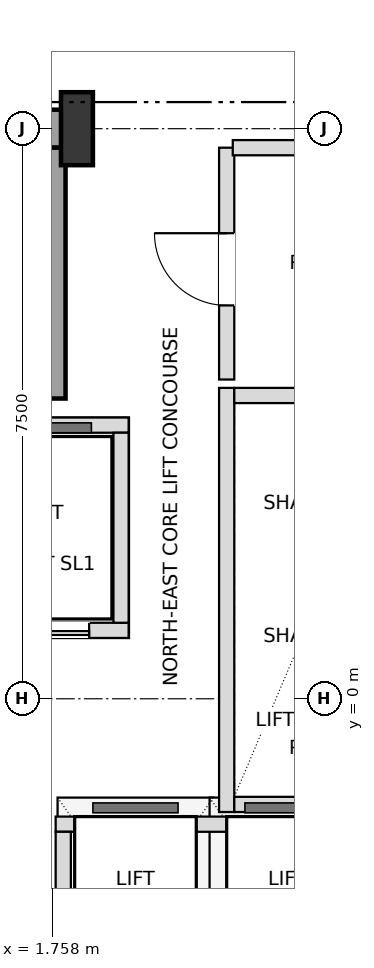
"""IFC4 building model, lengths in metres.
Left out: names, types, materials, properties, quantities, classifications, styles, units other than length and angle.
Written with IfcOpenShell. Run it as: python <this file> out.ifc"""

import sys

from ifc_helpers import new_model, si_unit, direction, frame, frame_2d, origin, origin_2d, place, context, subcontext, project, spatial, rectangle, i_section, extrude, element, fill, save


model = new_model("IFC4")
c1 = context("Model", 3, precision=1e-05, world=origin(), true_north=direction((0.0, 1.0)))
c2 = subcontext(c1, "Body", "Model", "MODEL_VIEW")
j1 = project(units=[si_unit("LENGTHUNIT", "METRE"), si_unit("PLANEANGLEUNIT", "RADIAN")], contexts=[c1])
p1 = place(None, origin())
s1 = spatial("IfcSite", under=j1, at=p1, CompositionType="ELEMENT")
p2 = place(p1, origin())
s2 = spatial("IfcBuilding", under=s1, at=p2, CompositionType="ELEMENT")
p3 = place(p2, frame((0.0, 0.0, 64.8)))
s3 = spatial("IfcBuildingStorey", under=s2, at=p3, CompositionType="ELEMENT", Elevation=64.8)
p4 = place(p3, frame((2.08, 7.5, 0.0), z_axis=(0.0, 0.0, 1.0), x_axis=(1.0, 0.0, 0.0)))
e1 = element("IfcColumn", 1, at=p4, inside=s3, PredefinedType="COLUMN", context=c2, shape_type="SweptSolid", body=[
    extrude(i_section(OverallWidth=0.42, OverallDepth=0.96, WebThickness=0.022, FlangeThickness=0.034, at=origin_2d()), origin(), (0.0, 0.0, 1.0), 3.6),
])
p5 = place(p3, frame((0.0, 7.5, 0.0), z_axis=(0.0, 0.0, 1.0), x_axis=(1.0, 0.0, 0.0)))
e2 = element("IfcWall", 2, at=p5, inside=s3, PredefinedType="SHEAR", context=c2, shape_type="SweptSolid", body=[
    extrude(rectangle(XDim=2.08, YDim=0.5, at=frame_2d((1.04, 0.0))), origin(), (0.0, 0.0, 1.0), 3.38),
])
p6 = place(p3, frame((1.73, 3.95, 0.0), z_axis=(0.0, 0.0, 1.0), x_axis=(0.0, 1.0, 0.0)))
e3 = element("IfcWall", 3, at=p6, inside=s3, PredefinedType="SHEAR", context=c2, shape_type="SweptSolid", body=[
    extrude(rectangle(XDim=3.3, YDim=0.4, at=frame_2d((1.65, 0.0))), origin(), (0.0, 0.0, 1.0), 3.38),
])
p7 = place(p3, frame((4.05, -1.49, 0.0), z_axis=(0.0, 0.0, 1.0), x_axis=(0.0, 1.0, 0.0)))
e4 = element("IfcWall", 4, at=p7, inside=s3, PredefinedType="SOLIDWALL", context=c2, shape_type="SweptSolid", body=[
    extrude(rectangle(XDim=5.58, YDim=0.2, at=frame_2d((2.79, 0.0))), origin(), (0.0, 0.0, 1.0), 3.38),
])
for number, where, z_axis, x_axis in (
    (5, (4.15, -1.39, 0.0), (0.0, 0.0, 1.0), (1.0, 0.0, 0.0)),
    (6, (4.15, 3.99, 0.0), (0.0, 0.0, 1.0), (1.0, 0.0, 0.0)),
):
    element("IfcWall", number, at=place(p3, frame(where, z_axis=z_axis, x_axis=x_axis)), inside=s3, PredefinedType="SOLIDWALL", context=c2, shape_type="SweptSolid", body=[
        extrude(rectangle(XDim=2.2, YDim=0.2, at=frame_2d((1.1, 0.0))), origin(), (0.0, 0.0, 1.0), 3.38),
    ])
p8 = place(p3, frame((-2.82, 0.9, 0.0), z_axis=(0.0, 0.0, 1.0), x_axis=(1.0, 0.0, 0.0)))
e7 = element("IfcWall", 7, at=p8, inside=s3, PredefinedType="SOLIDWALL", context=c2, shape_type="SweptSolid", body=[
    extrude(rectangle(XDim=5.58, YDim=0.2, at=frame_2d((2.79, 0.0))), origin(), (0.0, 0.0, 1.0), 3.38),
])
p9 = place(p8, frame((3.86, 0.0, 0.0)))
e8 = element("IfcOpeningElement", 8, at=p9, cuts=e7, PredefinedType="OPENING", context=c2, shape_type="SweptSolid", body=[
    extrude(rectangle(XDim=1.2, YDim=2.2, at=frame_2d((0.6, 1.1))), frame((0.0, 0.11, 0.0), z_axis=(0.0, -1.0, 0.0), x_axis=(1.0, 0.0, 0.0)), (0.0, 0.0, 1.0), 0.22),
])
p10 = place(p3, frame((-2.82, 3.6, 0.0), z_axis=(0.0, 0.0, 1.0), x_axis=(1.0, 0.0, 0.0)))
e9 = element("IfcWall", 9, at=p10, inside=s3, PredefinedType="SOLIDWALL", context=c2, shape_type="SweptSolid", body=[
    extrude(rectangle(XDim=5.58, YDim=0.2, at=frame_2d((2.79, 0.0))), origin(), (0.0, 0.0, 1.0), 3.38),
])
p11 = place(p3, frame((2.66, 1.0, 0.0), z_axis=(0.0, 0.0, 1.0), x_axis=(0.0, 1.0, 0.0)))
e10 = element("IfcWall", 10, at=p11, inside=s3, PredefinedType="SOLIDWALL", context=c2, shape_type="SweptSolid", body=[
    extrude(rectangle(XDim=2.5, YDim=0.2, at=frame_2d((1.25, 0.0))), origin(), (0.0, 0.0, 1.0), 3.38),
])
p12 = place(p3, frame((1.8, -1.65, 0.0), z_axis=(0.0, 0.0, 1.0), x_axis=(1.0, 0.0, 0.0)))
e11 = element("IfcWall", 11, at=p12, inside=s3, PredefinedType="SOLIDWALL", context=c2, shape_type="SweptSolid", body=[
    extrude(rectangle(XDim=4.1, YDim=0.2, at=frame_2d((2.05, 0.0))), origin(), (0.0, 0.0, 1.0), 3.38),
])
p13 = place(p3, frame((1.9, -3.75, 0.0), z_axis=(0.0, 0.0, 1.0), x_axis=(0.0, 1.0, 0.0)))
e12 = element("IfcWall", 12, at=p13, inside=s3, PredefinedType="SOLIDWALL", context=c2, shape_type="SweptSolid", body=[
    extrude(rectangle(XDim=2.0, YDim=0.2, at=frame_2d((1.0, 0.0))), origin(), (0.0, 0.0, 1.0), 3.38),
])
p14 = place(p3, frame((4.05, 4.2, 0.0), z_axis=(0.0, 0.0, 1.0), x_axis=(0.0, 1.0, 0.0)))
e13 = element("IfcWall", 13, at=p14, inside=s3, PredefinedType="SOLIDWALL", context=c2, shape_type="SweptSolid", body=[
    extrude(rectangle(XDim=3.05, YDim=0.2, at=frame_2d((1.525, 0.0))), origin(), (0.0, 0.0, 1.0), 3.38),
])
p15 = place(p14, frame((0.975, 0.0, 0.0)))
e14 = element("IfcOpeningElement", 14, at=p15, cuts=e13, PredefinedType="OPENING", context=c2, shape_type="SweptSolid", body=[
    extrude(rectangle(XDim=0.95, YDim=2.15, at=frame_2d((0.475, 1.075))), frame((0.0, 0.11, 0.0), z_axis=(0.0, -1.0, 0.0), x_axis=(1.0, 0.0, 0.0)), (0.0, 0.0, 1.0), 0.22),
])
p16 = place(p3, frame((4.13, 7.25, 0.0), z_axis=(0.0, 0.0, 1.0), x_axis=(1.0, 0.0, 0.0)))
e15 = element("IfcWall", 15, at=p16, inside=s3, PredefinedType="SOLIDWALL", context=c2, shape_type="SweptSolid", body=[
    extrude(rectangle(XDim=2.07, YDim=0.2, at=frame_2d((1.035, 0.0))), origin(), (0.0, 0.0, 1.0), 3.38),
])
p17 = place(p9, origin())
e16 = element("IfcDoor", 16, at=p17, inside=s3, OperationType="DOUBLE_DOOR_SLIDING", PredefinedType="DOOR", context=c2, shape_type="SweptSolid", body=[
    extrude(rectangle(XDim=1.2, YDim=2.2, at=frame_2d((0.6, 1.1))), frame((0.0, 0.025, 0.0), z_axis=(0.0, -1.0, 0.0), x_axis=(1.0, 0.0, 0.0)), (0.0, 0.0, 1.0), 0.05),
])
fill(e8, e16)
p18 = place(p15, origin())
e17 = element("IfcDoor", 17, at=p18, inside=s3, OperationType="SINGLE_SWING_RIGHT", PredefinedType="DOOR", context=c2, shape_type="SweptSolid", body=[
    extrude(rectangle(XDim=0.95, YDim=2.15, at=frame_2d((0.475, 1.075))), frame((0.0, 0.025, 0.0), z_axis=(0.0, -1.0, 0.0), x_axis=(1.0, 0.0, 0.0)), (0.0, 0.0, 1.0), 0.05),
])
fill(e14, e17)
save(model, sys.argv[1])
